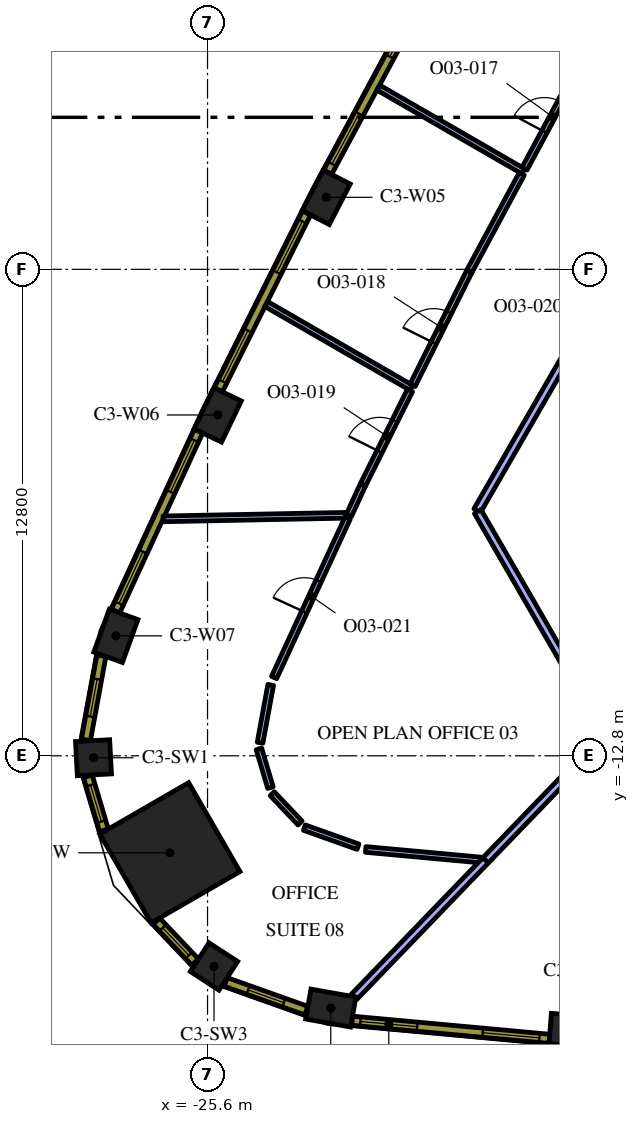
"""IFC4 building model, lengths in metres.
Left out: names, types, materials, properties, quantities, classifications, styles, units other than length and angle.
Written with IfcOpenShell. Run it as: python <this file> out.ifc"""

import sys

from ifc_helpers import new_model, si_unit, direction, frame, frame_2d, origin, origin_2d, place, context, subcontext, project, spatial, rectangle, extrude, element, fill, save


model = new_model("IFC4")
c1 = context("Model", 3, precision=1e-05, world=origin(), true_north=direction((0.0, 1.0)))
c2 = subcontext(c1, "Body", "Model", "MODEL_VIEW")
j1 = project(units=[si_unit("LENGTHUNIT", "METRE"), si_unit("PLANEANGLEUNIT", "RADIAN")], contexts=[c1])
p1 = place(None, origin())
s1 = spatial("IfcSite", under=j1, at=p1, CompositionType="ELEMENT")
p2 = place(p1, origin())
s2 = spatial("IfcBuilding", under=s1, at=p2, CompositionType="ELEMENT")
p3 = place(p2, frame((0.0, 0.0, 166.8)))
s3 = spatial("IfcBuildingStorey", under=s2, at=p3, CompositionType="ELEMENT", Elevation=166.8)
p4 = place(p3, frame((-26.591, -15.352, 0.0), z_axis=(0.0, 0.0, 1.0), x_axis=(-0.866025403784, -0.5, 0.0)))
e1 = element("IfcColumn", 1, at=p4, inside=s3, PredefinedType="COLUMN", context=c2, shape_type="SweptSolid", body=[
    extrude(rectangle(XDim=2.7, YDim=2.7, at=origin_2d()), origin(), (0.0, 0.0, 1.0), 4.2),
])
for number, where, z_axis, x_axis in (
    (2, (-22.357, -19.437, 0.0), (0.0, 0.0, 1.0), (0.985, -0.175, 0.0)),
    (3, (-15.985, -20.022, 0.0), (0.0, 0.0, 1.0), (0.997, -0.076, 0.0)),
    (4, (-22.476, 1.896, 0.0), (0.0, 0.0, 1.0), (-0.46, -0.888, 0.0)),
    (5, (-25.332, -3.832, 0.0), (0.0, 0.0, 1.0), (-0.433, -0.902, 0.0)),
    (6, (-28.012, -9.644, 0.0), (0.0, 0.0, 1.0), (-0.341, -0.94, 0.0)),
):
    element("IfcColumn", number, at=place(p3, frame(where, z_axis=z_axis, x_axis=x_axis)), inside=s3, PredefinedType="COLUMN", context=c2, shape_type="SweptSolid", body=[
        extrude(rectangle(XDim=1.2, YDim=0.8, at=origin_2d()), origin(), (0.0, 0.0, 1.0), 4.2),
    ])
for number, where, z_axis, x_axis in (
    (7, (-28.601, -12.851, 0.0), (0.0, 0.0, 1.0), (0.053, -0.999, 0.0)),
    (8, (-25.43, -18.344, 0.0), (0.0, 0.0, 1.0), (0.838, -0.546, 0.0)),
):
    element("IfcColumn", number, at=place(p3, frame(where, z_axis=z_axis, x_axis=x_axis)), inside=s3, PredefinedType="COLUMN", context=c2, shape_type="SweptSolid", body=[
        extrude(rectangle(XDim=0.9, YDim=0.9, at=origin_2d()), origin(), (0.0, 0.0, 1.0), 4.2),
    ])
p5 = place(p3, frame((-18.288, -15.557, 0.0), z_axis=(0.0, 0.0, 1.0), x_axis=(0.693944823318, 0.720028181525, 0.0)))
e9 = element("IfcWall", 9, at=p5, inside=s3, PredefinedType="PARTITIONING", context=c2, shape_type="SweptSolid", body=[
    extrude(rectangle(XDim=4.596, YDim=0.2, at=frame_2d((2.298, 0.0))), origin(), (0.0, 0.0, 1.0), 3.15),
])
p6 = place(p3, frame((-21.742, -19.14, 0.0), z_axis=(0.0, 0.0, 1.0), x_axis=(0.693986944276, 0.719987584042, 0.0)))
e10 = element("IfcWall", 10, at=p6, inside=s3, PredefinedType="PARTITIONING", context=c2, shape_type="SweptSolid", body=[
    extrude(rectangle(XDim=4.986, YDim=0.2, at=frame_2d((2.493, 0.0))), origin(), (0.0, 0.0, 1.0), 3.15),
])
p7 = place(p3, frame((-17.295, 2.581, 0.0), z_axis=(0.0, 0.0, 1.0), x_axis=(-0.866033195618, 0.499986503906, 0.0)))
e11 = element("IfcWall", 11, at=p7, inside=s3, PredefinedType="PARTITIONING", context=c2, shape_type="SweptSolid", body=[
    extrude(rectangle(XDim=4.402, YDim=0.15, at=frame_2d((2.201, 0.0))), origin(), (0.0, 0.0, 1.0), 3.15),
])
p8 = place(p3, frame((-17.259, 2.647, 0.0), z_axis=(0.0, 0.0, 1.0), x_axis=(0.473299711777, 0.880901460341, 0.0)))
e12 = element("IfcWall", 12, at=p8, inside=s3, PredefinedType="PARTITIONING", context=c2, shape_type="SweptSolid", body=[
    extrude(rectangle(XDim=3.203, YDim=0.15, at=frame_2d((1.602, 0.0))), origin(), (0.0, 0.0, 1.0), 3.15),
])
p9 = place(p8, frame((1.104, 0.0, 0.0)))
e13 = element("IfcOpeningElement", 13, at=p9, cuts=e12, PredefinedType="OPENING", context=c2, shape_type="SweptSolid", body=[
    extrude(rectangle(XDim=0.9, YDim=2.1, at=frame_2d((0.45, 1.05))), frame((0.0, 0.085, 0.0), z_axis=(0.0, -1.0, 0.0), x_axis=(1.0, 0.0, 0.0)), (0.0, 0.0, 1.0), 0.17),
])
p10 = place(p3, frame((-20.238, -3.117, 0.0), z_axis=(0.0, 0.0, 1.0), x_axis=(-0.866026031126, 0.499998913411, 0.0)))
e14 = element("IfcWall", 14, at=p10, inside=s3, PredefinedType="PARTITIONING", context=c2, shape_type="SweptSolid", body=[
    extrude(rectangle(XDim=4.408, YDim=0.15, at=frame_2d((2.204, 0.0))), origin(), (0.0, 0.0, 1.0), 3.15),
])
p11 = place(p3, frame((-17.33, 2.515, 0.0), z_axis=(0.0, 0.0, 1.0), x_axis=(-0.473335958085, -0.880881984595, 0.0)))
e15 = element("IfcWall", 15, at=p11, inside=s3, PredefinedType="PARTITIONING", context=c2, shape_type="SweptSolid", body=[
    extrude(rectangle(XDim=2.917, YDim=0.15, at=frame_2d((1.458, 0.0))), origin(), (0.0, 0.0, 1.0), 3.15),
])
p12 = place(p3, frame((-20.204, -3.049, 0.0), z_axis=(0.0, 0.0, 1.0), x_axis=(0.446250363478, 0.894908159029, 0.0)))
e16 = element("IfcWall", 16, at=p12, inside=s3, PredefinedType="PARTITIONING", context=c2, shape_type="SweptSolid", body=[
    extrude(rectangle(XDim=3.347, YDim=0.15, at=frame_2d((1.673, 0.0))), origin(), (0.0, 0.0, 1.0), 3.15),
])
p13 = place(p12, frame((1.247, 0.0, 0.0)))
e17 = element("IfcOpeningElement", 17, at=p13, cuts=e16, PredefinedType="OPENING", context=c2, shape_type="SweptSolid", body=[
    extrude(rectangle(XDim=0.9, YDim=2.1, at=frame_2d((0.45, 1.05))), frame((0.0, 0.085, 0.0), z_axis=(0.0, -1.0, 0.0), x_axis=(1.0, 0.0, 0.0)), (0.0, 0.0, 1.0), 0.17),
])
p14 = place(p3, frame((-21.509, -5.666, 0.0), z_axis=(0.0, 0.0, 1.0), x_axis=(0.446192228952, 0.894937145739, 0.0)))
e18 = element("IfcWall", 18, at=p14, inside=s3, PredefinedType="PARTITIONING", context=c2, shape_type="SweptSolid", body=[
    extrude(rectangle(XDim=2.774, YDim=0.15, at=frame_2d((1.387, 0.0))), origin(), (0.0, 0.0, 1.0), 3.15),
])
p15 = place(p14, frame((0.973, 0.0, 0.0)))
e19 = element("IfcOpeningElement", 19, at=p15, cuts=e18, PredefinedType="OPENING", context=c2, shape_type="SweptSolid", body=[
    extrude(rectangle(XDim=0.9, YDim=2.1, at=frame_2d((0.45, 1.05))), frame((0.0, 0.085, 0.0), z_axis=(0.0, -1.0, 0.0), x_axis=(1.0, 0.0, 0.0)), (0.0, 0.0, 1.0), 0.17),
])
p16 = place(p3, frame((-21.509, -5.666, 0.0), z_axis=(0.0, 0.0, 1.0), x_axis=(-0.4188658149, -0.908048142506, 0.0)))
e20 = element("IfcWall", 20, at=p16, inside=s3, PredefinedType="PARTITIONING", context=c2, shape_type="SweptSolid", body=[
    extrude(rectangle(XDim=0.885, YDim=0.15, at=frame_2d((0.443, 0.0))), origin(), (0.0, 0.0, 1.0), 3.15),
])
p17 = place(p3, frame((-21.963, -6.472, 0.0), z_axis=(0.0, 0.0, 1.0), x_axis=(-0.999809788098, -0.019503528505, 0.0)))
e21 = element("IfcWall", 21, at=p17, inside=s3, PredefinedType="PARTITIONING", context=c2, shape_type="SweptSolid", body=[
    extrude(rectangle(XDim=4.807, YDim=0.15, at=frame_2d((2.403, 0.0))), origin(), (0.0, 0.0, 1.0), 3.15),
])
p18 = place(p3, frame((-18.412, -15.542, 0.0), z_axis=(0.0, 0.0, 1.0), x_axis=(-0.995812481052, 0.091419377496, 0.0)))
e22 = element("IfcWall", 22, at=p18, inside=s3, PredefinedType="PARTITIONING", context=c2, shape_type="SweptSolid", body=[
    extrude(rectangle(XDim=3.039, YDim=0.15, at=frame_2d((1.52, 0.0))), origin(), (0.0, 0.0, 1.0), 3.15),
])
p19 = place(p3, frame((-21.64, -15.192, 0.0), z_axis=(0.0, 0.0, 1.0), x_axis=(-0.942099140138, 0.335334475041, 0.0)))
e23 = element("IfcWall", 23, at=p19, inside=s3, PredefinedType="PARTITIONING", context=c2, shape_type="SweptSolid", body=[
    extrude(rectangle(XDim=1.498, YDim=0.15, at=frame_2d((0.749, 0.0))), origin(), (0.0, 0.0, 1.0), 3.15),
])
p20 = place(p3, frame((-23.165, -14.57, 0.0), z_axis=(0.0, 0.0, 1.0), x_axis=(-0.688049940621, 0.725663337375, 0.0)))
e24 = element("IfcWall", 24, at=p20, inside=s3, PredefinedType="PARTITIONING", context=c2, shape_type="SweptSolid", body=[
    extrude(rectangle(XDim=1.064, YDim=0.15, at=frame_2d((0.532, 0.0))), origin(), (0.0, 0.0, 1.0), 3.15),
])
p21 = place(p3, frame((-23.945, -13.638, 0.0), z_axis=(0.0, 0.0, 1.0), x_axis=(-0.284463225945, 0.9586869526, 0.0)))
e25 = element("IfcWall", 25, at=p21, inside=s3, PredefinedType="PARTITIONING", context=c2, shape_type="SweptSolid", body=[
    extrude(rectangle(XDim=1.064, YDim=0.15, at=frame_2d((0.532, 0.0))), origin(), (0.0, 0.0, 1.0), 3.15),
])
p22 = place(p3, frame((-24.217, -12.455, 0.0), z_axis=(0.0, 0.0, 1.0), x_axis=(0.180635934027, 0.983550028894, 0.0)))
e26 = element("IfcWall", 26, at=p22, inside=s3, PredefinedType="PARTITIONING", context=c2, shape_type="SweptSolid", body=[
    extrude(rectangle(XDim=1.546, YDim=0.15, at=frame_2d((0.773, 0.0))), origin(), (0.0, 0.0, 1.0), 3.15),
])
p23 = place(p3, frame((-23.848, -10.74, 0.0), z_axis=(0.0, 0.0, 1.0), x_axis=(0.418723219841, 0.908113905392, 0.0)))
e27 = element("IfcWall", 27, at=p23, inside=s3, PredefinedType="PARTITIONING", context=c2, shape_type="SweptSolid", body=[
    extrude(rectangle(XDim=4.623, YDim=0.15, at=frame_2d((2.311, 0.0))), origin(), (0.0, 0.0, 1.0), 3.15),
])
p24 = place(p23, frame((1.9, 0.0, 0.0)))
e28 = element("IfcOpeningElement", 28, at=p24, cuts=e27, PredefinedType="OPENING", context=c2, shape_type="SweptSolid", body=[
    extrude(rectangle(XDim=0.9, YDim=2.1, at=frame_2d((0.45, 1.05))), frame((0.0, 0.085, 0.0), z_axis=(0.0, -1.0, 0.0), x_axis=(1.0, 0.0, 0.0)), (0.0, 0.0, 1.0), 0.17),
])
p25 = place(p3, frame((-13.146, 2.931, 0.0), z_axis=(0.0, 0.0, 1.0), x_axis=(-0.499997861235, -0.866026638597, 0.0)))
e29 = element("IfcWall", 29, at=p25, inside=s3, PredefinedType="PARTITIONING", context=c2, shape_type="SweptSolid", body=[
    extrude(rectangle(XDim=10.717, YDim=0.2, at=frame_2d((5.359, 0.0))), origin(), (0.0, 0.0, 1.0), 3.15),
])
p26 = place(p25, frame((4.9, 0.0, 0.0)))
e30 = element("IfcOpeningElement", 30, at=p26, cuts=e29, PredefinedType="OPENING", context=c2, shape_type="SweptSolid", body=[
    extrude(rectangle(XDim=1.0, YDim=2.1, at=frame_2d((0.5, 1.05))), frame((0.0, 0.11, 0.0), z_axis=(0.0, -1.0, 0.0), x_axis=(1.0, 0.0, 0.0)), (0.0, 0.0, 1.0), 0.22),
])
p27 = place(p3, frame((-18.489, -6.376, 0.0), z_axis=(0.0, 0.0, 1.0), x_axis=(0.499989401968, -0.866031522475, 0.0)))
e31 = element("IfcWall", 31, at=p27, inside=s3, PredefinedType="PARTITIONING", context=c2, shape_type="SweptSolid", body=[
    extrude(rectangle(XDim=6.677, YDim=0.2, at=frame_2d((3.338, 0.0))), origin(), (0.0, 0.0, 1.0), 3.15),
])
p28 = place(p3, frame((-21.797, -19.77, 0.0), z_axis=(0.0, 0.0, 1.0), x_axis=(0.995808712151, -0.091460422067, 0.0)))
e32 = element("IfcWall", 32, at=p28, inside=s3, PredefinedType="SOLIDWALL", context=c2, shape_type="SweptSolid", body=[
    extrude(rectangle(XDim=5.213, YDim=0.24, at=frame_2d((2.606, 0.0))), origin(), (0.0, 0.0, 1.0), 3.95),
])
p29 = place(p28, frame((0.221, 0.0, 0.9)))
e33 = element("IfcOpeningElement", 33, at=p29, cuts=e32, PredefinedType="OPENING", context=c2, shape_type="SweptSolid", body=[
    extrude(rectangle(XDim=1.5, YDim=2.55, at=frame_2d((0.75, 1.275))), frame((0.0, 0.13, 0.0), z_axis=(0.0, -1.0, 0.0), x_axis=(1.0, 0.0, 0.0)), (0.0, 0.0, 1.0), 0.26),
])
p30 = place(p28, frame((3.452, 0.0, 0.9)))
e34 = element("IfcOpeningElement", 34, at=p30, cuts=e32, PredefinedType="OPENING", context=c2, shape_type="SweptSolid", body=[
    extrude(rectangle(XDim=1.5, YDim=2.55, at=frame_2d((0.75, 1.275))), frame((0.0, 0.13, 0.0), z_axis=(0.0, -1.0, 0.0), x_axis=(1.0, 0.0, 0.0)), (0.0, 0.0, 1.0), 0.26),
])
p31 = place(p3, frame((-19.977, 7.139, 0.0), z_axis=(0.0, 0.0, 1.0), x_axis=(-0.473349833294, -0.880874528704, 0.0)))
e35 = element("IfcWall", 35, at=p31, inside=s3, PredefinedType="SOLIDWALL", context=c2, shape_type="SweptSolid", body=[
    extrude(rectangle(XDim=5.204, YDim=0.24, at=frame_2d((2.602, 0.0))), origin(), (0.0, 0.0, 1.0), 3.95),
])
p32 = place(p31, frame((0.248, 0.0, 0.9)))
e36 = element("IfcOpeningElement", 36, at=p32, cuts=e35, PredefinedType="OPENING", context=c2, shape_type="SweptSolid", body=[
    extrude(rectangle(XDim=1.5, YDim=2.55, at=frame_2d((0.75, 1.275))), frame((0.0, 0.13, 0.0), z_axis=(0.0, -1.0, 0.0), x_axis=(1.0, 0.0, 0.0)), (0.0, 0.0, 1.0), 0.26),
])
p33 = place(p31, frame((3.455, 0.0, 0.9)))
e37 = element("IfcOpeningElement", 37, at=p33, cuts=e35, PredefinedType="OPENING", context=c2, shape_type="SweptSolid", body=[
    extrude(rectangle(XDim=1.5, YDim=2.55, at=frame_2d((0.75, 1.275))), frame((0.0, 0.13, 0.0), z_axis=(0.0, -1.0, 0.0), x_axis=(1.0, 0.0, 0.0)), (0.0, 0.0, 1.0), 0.26),
])
p34 = place(p3, frame((-22.994, 1.485, 0.0), z_axis=(0.0, 0.0, 1.0), x_axis=(-0.446256171312, -0.8949052629, 0.0)))
e38 = element("IfcWall", 38, at=p34, inside=s3, PredefinedType="SOLIDWALL", context=c2, shape_type="SweptSolid", body=[
    extrude(rectangle(XDim=5.203, YDim=0.24, at=frame_2d((2.602, 0.0))), origin(), (0.0, 0.0, 1.0), 3.95),
])
p35 = place(p34, frame((0.248, 0.0, 0.9)))
e39 = element("IfcOpeningElement", 39, at=p35, cuts=e38, PredefinedType="OPENING", context=c2, shape_type="SweptSolid", body=[
    extrude(rectangle(XDim=1.5, YDim=2.55, at=frame_2d((0.75, 1.275))), frame((0.0, 0.13, 0.0), z_axis=(0.0, -1.0, 0.0), x_axis=(1.0, 0.0, 0.0)), (0.0, 0.0, 1.0), 0.26),
])
p36 = place(p34, frame((3.455, 0.0, 0.9)))
e40 = element("IfcOpeningElement", 40, at=p36, cuts=e38, PredefinedType="OPENING", context=c2, shape_type="SweptSolid", body=[
    extrude(rectangle(XDim=1.5, YDim=2.55, at=frame_2d((0.75, 1.275))), frame((0.0, 0.13, 0.0), z_axis=(0.0, -1.0, 0.0), x_axis=(1.0, 0.0, 0.0)), (0.0, 0.0, 1.0), 0.26),
])
p37 = place(p3, frame((-25.837, -4.258, 0.0), z_axis=(0.0, 0.0, 1.0), x_axis=(-0.418722559465, -0.908114209885, 0.0)))
e41 = element("IfcWall", 41, at=p37, inside=s3, PredefinedType="SOLIDWALL", context=c2, shape_type="SweptSolid", body=[
    extrude(rectangle(XDim=5.213, YDim=0.24, at=frame_2d((2.606, 0.0))), origin(), (0.0, 0.0, 1.0), 3.95),
])
p38 = place(p37, frame((0.261, 0.0, 0.9)))
e42 = element("IfcOpeningElement", 42, at=p38, cuts=e41, PredefinedType="OPENING", context=c2, shape_type="SweptSolid", body=[
    extrude(rectangle(XDim=1.5, YDim=2.55, at=frame_2d((0.75, 1.275))), frame((0.0, 0.13, 0.0), z_axis=(0.0, -1.0, 0.0), x_axis=(1.0, 0.0, 0.0)), (0.0, 0.0, 1.0), 0.26),
])
p39 = place(p37, frame((3.492, 0.0, 0.9)))
e43 = element("IfcOpeningElement", 43, at=p39, cuts=e41, PredefinedType="OPENING", context=c2, shape_type="SweptSolid", body=[
    extrude(rectangle(XDim=1.5, YDim=2.55, at=frame_2d((0.75, 1.275))), frame((0.0, 0.13, 0.0), z_axis=(0.0, -1.0, 0.0), x_axis=(1.0, 0.0, 0.0)), (0.0, 0.0, 1.0), 0.26),
])
p40 = place(p3, frame((-28.393, -10.167, 0.0), z_axis=(0.0, 0.0, 1.0), x_axis=(-0.180737189259, -0.983531427265, 0.0)))
e44 = element("IfcWall", 44, at=p40, inside=s3, PredefinedType="SOLIDWALL", context=c2, shape_type="SweptSolid", body=[
    extrude(rectangle(XDim=2.25, YDim=0.24, at=frame_2d((1.125, 0.0))), origin(), (0.0, 0.0, 1.0), 3.95),
])
p41 = place(p40, frame((0.625, 0.0, 0.9)))
e45 = element("IfcOpeningElement", 45, at=p41, cuts=e44, PredefinedType="OPENING", context=c2, shape_type="SweptSolid", body=[
    extrude(rectangle(XDim=1.0, YDim=2.55, at=frame_2d((0.5, 1.275))), frame((0.0, 0.13, 0.0), z_axis=(0.0, -1.0, 0.0), x_axis=(1.0, 0.0, 0.0)), (0.0, 0.0, 1.0), 0.26),
])
p42 = place(p3, frame((-28.748, -13.34, 0.0), z_axis=(0.0, 0.0, 1.0), x_axis=(0.284413721403, -0.958701640281, 0.0)))
e46 = element("IfcWall", 46, at=p42, inside=s3, PredefinedType="SOLIDWALL", context=c2, shape_type="SweptSolid", body=[
    extrude(rectangle(XDim=1.482, YDim=0.24, at=frame_2d((0.741, 0.0))), origin(), (0.0, 0.0, 1.0), 3.95),
])
p43 = place(p42, frame((0.241, 0.0, 0.9)))
e47 = element("IfcOpeningElement", 47, at=p43, cuts=e46, PredefinedType="OPENING", context=c2, shape_type="SweptSolid", body=[
    extrude(rectangle(XDim=1.0, YDim=2.55, at=frame_2d((0.5, 1.275))), frame((0.0, 0.13, 0.0), z_axis=(0.0, -1.0, 0.0), x_axis=(1.0, 0.0, 0.0)), (0.0, 0.0, 1.0), 0.26),
])
p44 = place(p3, frame((-26.946, -17.151, 0.0), z_axis=(0.0, 0.0, 1.0), x_axis=(0.687986858937, -0.725723144133, 0.0)))
e48 = element("IfcWall", 48, at=p44, inside=s3, PredefinedType="SOLIDWALL", context=c2, shape_type="SweptSolid", body=[
    extrude(rectangle(XDim=1.481, YDim=0.24, at=frame_2d((0.741, 0.0))), origin(), (0.0, 0.0, 1.0), 3.95),
])
p45 = place(p44, frame((0.241, 0.0, 0.9)))
e49 = element("IfcOpeningElement", 49, at=p45, cuts=e48, PredefinedType="OPENING", context=c2, shape_type="SweptSolid", body=[
    extrude(rectangle(XDim=1.0, YDim=2.55, at=frame_2d((0.5, 1.275))), frame((0.0, 0.13, 0.0), z_axis=(0.0, -1.0, 0.0), x_axis=(1.0, 0.0, 0.0)), (0.0, 0.0, 1.0), 0.26),
])
p46 = place(p3, frame((-25.121, -18.751, 0.0), z_axis=(0.0, 0.0, 1.0), x_axis=(0.942099727267, -0.335332825539, 0.0)))
e50 = element("IfcWall", 50, at=p46, inside=s3, PredefinedType="SOLIDWALL", context=c2, shape_type="SweptSolid", body=[
    extrude(rectangle(XDim=2.25, YDim=0.24, at=frame_2d((1.125, 0.0))), origin(), (0.0, 0.0, 1.0), 3.95),
])
p47 = place(p46, frame((0.625, 0.0, 0.9)))
e51 = element("IfcOpeningElement", 51, at=p47, cuts=e50, PredefinedType="OPENING", context=c2, shape_type="SweptSolid", body=[
    extrude(rectangle(XDim=1.0, YDim=2.55, at=frame_2d((0.5, 1.275))), frame((0.0, 0.13, 0.0), z_axis=(0.0, -1.0, 0.0), x_axis=(1.0, 0.0, 0.0)), (0.0, 0.0, 1.0), 0.26),
])
p48 = place(p9, origin())
e52 = element("IfcDoor", 52, at=p48, inside=s3, OperationType="SINGLE_SWING_LEFT", PredefinedType="DOOR", context=c2, shape_type="SweptSolid", body=[
    extrude(rectangle(XDim=0.9, YDim=2.1, at=frame_2d((0.45, 1.05))), frame((0.0, 0.025, 0.0), z_axis=(0.0, -1.0, 0.0), x_axis=(1.0, 0.0, 0.0)), (0.0, 0.0, 1.0), 0.05),
])
fill(e13, e52)
p49 = place(p13, origin())
e53 = element("IfcDoor", 53, at=p49, inside=s3, OperationType="SINGLE_SWING_RIGHT", PredefinedType="DOOR", context=c2, shape_type="SweptSolid", body=[
    extrude(rectangle(XDim=0.9, YDim=2.1, at=frame_2d((0.45, 1.05))), frame((0.0, 0.025, 0.0), z_axis=(0.0, -1.0, 0.0), x_axis=(1.0, 0.0, 0.0)), (0.0, 0.0, 1.0), 0.05),
])
fill(e17, e53)
p50 = place(p15, origin())
e54 = element("IfcDoor", 54, at=p50, inside=s3, OperationType="SINGLE_SWING_RIGHT", PredefinedType="DOOR", context=c2, shape_type="SweptSolid", body=[
    extrude(rectangle(XDim=0.9, YDim=2.1, at=frame_2d((0.45, 1.05))), frame((0.0, 0.025, 0.0), z_axis=(0.0, -1.0, 0.0), x_axis=(1.0, 0.0, 0.0)), (0.0, 0.0, 1.0), 0.05),
])
fill(e19, e54)
p51 = place(p24, origin())
e55 = element("IfcDoor", 55, at=p51, inside=s3, OperationType="SINGLE_SWING_RIGHT", PredefinedType="DOOR", context=c2, shape_type="SweptSolid", body=[
    extrude(rectangle(XDim=0.9, YDim=2.1, at=frame_2d((0.45, 1.05))), frame((0.0, 0.025, 0.0), z_axis=(0.0, -1.0, 0.0), x_axis=(1.0, 0.0, 0.0)), (0.0, 0.0, 1.0), 0.05),
])
fill(e28, e55)
p52 = place(p29, origin())
e56 = element("IfcWindow", 56, at=p52, inside=s3, PartitioningType="SINGLE_PANEL", PredefinedType="WINDOW", context=c2, shape_type="SweptSolid", body=[
    extrude(rectangle(XDim=1.5, YDim=2.55, at=frame_2d((0.75, 1.275))), frame((0.0, 0.04, 0.0), z_axis=(0.0, -1.0, 0.0), x_axis=(1.0, 0.0, 0.0)), (0.0, 0.0, 1.0), 0.06),
])
fill(e33, e56)
p53 = place(p30, origin())
e57 = element("IfcWindow", 57, at=p53, inside=s3, PartitioningType="SINGLE_PANEL", PredefinedType="WINDOW", context=c2, shape_type="SweptSolid", body=[
    extrude(rectangle(XDim=1.5, YDim=2.55, at=frame_2d((0.75, 1.275))), frame((0.0, 0.04, 0.0), z_axis=(0.0, -1.0, 0.0), x_axis=(1.0, 0.0, 0.0)), (0.0, 0.0, 1.0), 0.06),
])
fill(e34, e57)
p54 = place(p32, origin())
e58 = element("IfcWindow", 58, at=p54, inside=s3, PartitioningType="SINGLE_PANEL", PredefinedType="WINDOW", context=c2, shape_type="SweptSolid", body=[
    extrude(rectangle(XDim=1.5, YDim=2.55, at=frame_2d((0.75, 1.275))), frame((0.0, 0.04, 0.0), z_axis=(0.0, -1.0, 0.0), x_axis=(1.0, 0.0, 0.0)), (0.0, 0.0, 1.0), 0.06),
])
fill(e36, e58)
p55 = place(p33, origin())
e59 = element("IfcWindow", 59, at=p55, inside=s3, PartitioningType="SINGLE_PANEL", PredefinedType="WINDOW", context=c2, shape_type="SweptSolid", body=[
    extrude(rectangle(XDim=1.5, YDim=2.55, at=frame_2d((0.75, 1.275))), frame((0.0, 0.04, 0.0), z_axis=(0.0, -1.0, 0.0), x_axis=(1.0, 0.0, 0.0)), (0.0, 0.0, 1.0), 0.06),
])
fill(e37, e59)
p56 = place(p35, origin())
e60 = element("IfcWindow", 60, at=p56, inside=s3, PartitioningType="SINGLE_PANEL", PredefinedType="WINDOW", context=c2, shape_type="SweptSolid", body=[
    extrude(rectangle(XDim=1.5, YDim=2.55, at=frame_2d((0.75, 1.275))), frame((0.0, 0.04, 0.0), z_axis=(0.0, -1.0, 0.0), x_axis=(1.0, 0.0, 0.0)), (0.0, 0.0, 1.0), 0.06),
])
fill(e39, e60)
p57 = place(p36, origin())
e61 = element("IfcWindow", 61, at=p57, inside=s3, PartitioningType="SINGLE_PANEL", PredefinedType="WINDOW", context=c2, shape_type="SweptSolid", body=[
    extrude(rectangle(XDim=1.5, YDim=2.55, at=frame_2d((0.75, 1.275))), frame((0.0, 0.04, 0.0), z_axis=(0.0, -1.0, 0.0), x_axis=(1.0, 0.0, 0.0)), (0.0, 0.0, 1.0), 0.06),
])
fill(e40, e61)
p58 = place(p38, origin())
e62 = element("IfcWindow", 62, at=p58, inside=s3, PartitioningType="SINGLE_PANEL", PredefinedType="WINDOW", context=c2, shape_type="SweptSolid", body=[
    extrude(rectangle(XDim=1.5, YDim=2.55, at=frame_2d((0.75, 1.275))), frame((0.0, 0.04, 0.0), z_axis=(0.0, -1.0, 0.0), x_axis=(1.0, 0.0, 0.0)), (0.0, 0.0, 1.0), 0.06),
])
fill(e42, e62)
p59 = place(p39, origin())
e63 = element("IfcWindow", 63, at=p59, inside=s3, PartitioningType="SINGLE_PANEL", PredefinedType="WINDOW", context=c2, shape_type="SweptSolid", body=[
    extrude(rectangle(XDim=1.5, YDim=2.55, at=frame_2d((0.75, 1.275))), frame((0.0, 0.04, 0.0), z_axis=(0.0, -1.0, 0.0), x_axis=(1.0, 0.0, 0.0)), (0.0, 0.0, 1.0), 0.06),
])
fill(e43, e63)
p60 = place(p41, origin())
e64 = element("IfcWindow", 64, at=p60, inside=s3, PartitioningType="SINGLE_PANEL", PredefinedType="WINDOW", context=c2, shape_type="SweptSolid", body=[
    extrude(rectangle(XDim=1.0, YDim=2.55, at=frame_2d((0.5, 1.275))), frame((0.0, 0.04, 0.0), z_axis=(0.0, -1.0, 0.0), x_axis=(1.0, 0.0, 0.0)), (0.0, 0.0, 1.0), 0.06),
])
fill(e45, e64)
p61 = place(p43, origin())
e65 = element("IfcWindow", 65, at=p61, inside=s3, PartitioningType="SINGLE_PANEL", PredefinedType="WINDOW", context=c2, shape_type="SweptSolid", body=[
    extrude(rectangle(XDim=1.0, YDim=2.55, at=frame_2d((0.5, 1.275))), frame((0.0, 0.04, 0.0), z_axis=(0.0, -1.0, 0.0), x_axis=(1.0, 0.0, 0.0)), (0.0, 0.0, 1.0), 0.06),
])
fill(e47, e65)
p62 = place(p45, origin())
e66 = element("IfcWindow", 66, at=p62, inside=s3, PartitioningType="SINGLE_PANEL", PredefinedType="WINDOW", context=c2, shape_type="SweptSolid", body=[
    extrude(rectangle(XDim=1.0, YDim=2.55, at=frame_2d((0.5, 1.275))), frame((0.0, 0.04, 0.0), z_axis=(0.0, -1.0, 0.0), x_axis=(1.0, 0.0, 0.0)), (0.0, 0.0, 1.0), 0.06),
])
fill(e49, e66)
p63 = place(p47, origin())
e67 = element("IfcWindow", 67, at=p63, inside=s3, PartitioningType="SINGLE_PANEL", PredefinedType="WINDOW", context=c2, shape_type="SweptSolid", body=[
    extrude(rectangle(XDim=1.0, YDim=2.55, at=frame_2d((0.5, 1.275))), frame((0.0, 0.04, 0.0), z_axis=(0.0, -1.0, 0.0), x_axis=(1.0, 0.0, 0.0)), (0.0, 0.0, 1.0), 0.06),
])
fill(e51, e67)
save(model, sys.argv[1])
